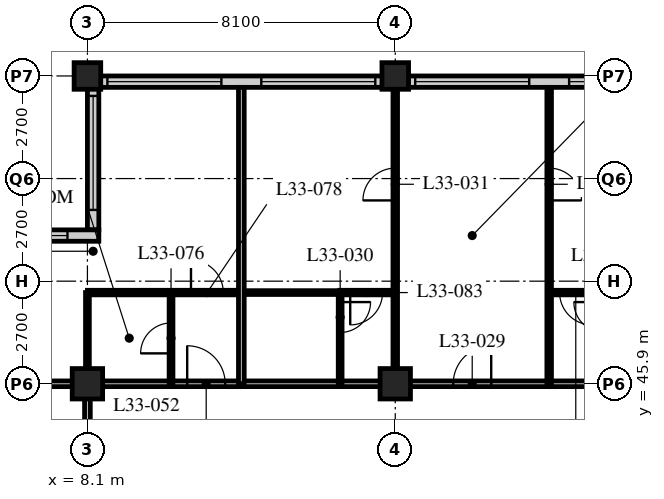
"""IFC4 building model, lengths in metres.
Left out: names, types, materials, properties, quantities, classifications, styles, units other than length and angle.
Written with IfcOpenShell. Run it as: python <this file> out.ifc"""

import sys

from ifc_helpers import new_model, si_unit, direction, frame, frame_2d, origin, origin_2d, place, context, subcontext, project, spatial, rectangle, hollow_rectangle, extrude, element, fill, save


model = new_model("IFC4")
c1 = context("Model", 3, precision=1e-05, world=origin(), true_north=direction((0.0, 1.0)))
c2 = subcontext(c1, "Body", "Model", "MODEL_VIEW")
j1 = project(units=[si_unit("LENGTHUNIT", "METRE"), si_unit("PLANEANGLEUNIT", "RADIAN")], contexts=[c1])
p1 = place(None, origin())
s1 = spatial("IfcSite", under=j1, at=p1, CompositionType="ELEMENT")
p2 = place(p1, origin())
s2 = spatial("IfcBuilding", under=s1, at=p2, CompositionType="ELEMENT")
p3 = place(p2, frame((0.0, 0.0, 130.6)))
s3 = spatial("IfcBuildingStorey", under=s2, at=p3, CompositionType="ELEMENT", Elevation=130.6)
p4 = place(p3, frame((8.1, 45.9, 0.0), z_axis=(0.0, 0.0, 1.0), x_axis=(1.0, 0.0, 0.0)))
e1 = element("IfcColumn", 1, at=p4, inside=s3, PredefinedType="COLUMN", context=c2, shape_type="SweptSolid", body=[
    extrude(hollow_rectangle(XDim=0.8, YDim=0.8, WallThickness=0.08, at=origin_2d()), origin(), (0.0, 0.0, 1.0), 3.4),
])
p5 = place(p3, frame((8.1, 54.0, 0.0), z_axis=(0.0, 0.0, 1.0), x_axis=(1.0, 0.0, 0.0)))
e2 = element("IfcColumn", 2, at=p5, inside=s3, PredefinedType="COLUMN", context=c2, shape_type="SweptSolid", body=[
    extrude(hollow_rectangle(XDim=0.7, YDim=0.7, WallThickness=0.07, at=origin_2d()), origin(), (0.0, 0.0, 1.0), 3.4),
])
p6 = place(p3, frame((16.2, 45.9, 0.0), z_axis=(0.0, 0.0, 1.0), x_axis=(1.0, 0.0, 0.0)))
e3 = element("IfcColumn", 3, at=p6, inside=s3, PredefinedType="COLUMN", context=c2, shape_type="SweptSolid", body=[
    extrude(hollow_rectangle(XDim=0.8, YDim=0.8, WallThickness=0.08, at=origin_2d()), origin(), (0.0, 0.0, 1.0), 3.4),
])
p7 = place(p3, frame((16.2, 54.0, 0.0), z_axis=(0.0, 0.0, 1.0), x_axis=(1.0, 0.0, 0.0)))
e4 = element("IfcColumn", 4, at=p7, inside=s3, PredefinedType="COLUMN", context=c2, shape_type="SweptSolid", body=[
    extrude(hollow_rectangle(XDim=0.7, YDim=0.7, WallThickness=0.07, at=origin_2d()), origin(), (0.0, 0.0, 1.0), 3.4),
])
p8 = place(p3, frame((48.3, 53.85, 0.0), z_axis=(0.0, 0.0, 1.0), x_axis=(-1.0, 0.0, 0.0)))
e5 = element("IfcWall", 5, at=p8, inside=s3, PredefinedType="SOLIDWALL", context=c2, shape_type="SweptSolid", body=[
    extrude(rectangle(XDim=40.2, YDim=0.3, at=frame_2d((20.1, 0.0))), origin(), (0.0, 0.0, 1.0), 3.19),
])
p9 = place(p8, frame((0.225, 0.0, 0.9)))
e6 = element("IfcOpeningElement", 6, at=p9, cuts=e5, PredefinedType="OPENING", context=c2, shape_type="SweptSolid", body=[
    extrude(rectangle(XDim=3.0, YDim=2.0, at=frame_2d((1.5, 1.0))), frame((0.0, 0.16, 0.0), z_axis=(0.0, -1.0, 0.0), x_axis=(1.0, 0.0, 0.0)), (0.0, 0.0, 1.0), 0.32),
])
p10 = place(p8, frame((4.275, 0.0, 0.9)))
e7 = element("IfcOpeningElement", 7, at=p10, cuts=e5, PredefinedType="OPENING", context=c2, shape_type="SweptSolid", body=[
    extrude(rectangle(XDim=3.0, YDim=2.0, at=frame_2d((1.5, 1.0))), frame((0.0, 0.16, 0.0), z_axis=(0.0, -1.0, 0.0), x_axis=(1.0, 0.0, 0.0)), (0.0, 0.0, 1.0), 0.32),
])
p11 = place(p8, frame((8.325, 0.0, 0.9)))
e8 = element("IfcOpeningElement", 8, at=p11, cuts=e5, PredefinedType="OPENING", context=c2, shape_type="SweptSolid", body=[
    extrude(rectangle(XDim=3.0, YDim=2.0, at=frame_2d((1.5, 1.0))), frame((0.0, 0.16, 0.0), z_axis=(0.0, -1.0, 0.0), x_axis=(1.0, 0.0, 0.0)), (0.0, 0.0, 1.0), 0.32),
])
p12 = place(p8, frame((12.375, 0.0, 0.9)))
e9 = element("IfcOpeningElement", 9, at=p12, cuts=e5, PredefinedType="OPENING", context=c2, shape_type="SweptSolid", body=[
    extrude(rectangle(XDim=3.0, YDim=2.0, at=frame_2d((1.5, 1.0))), frame((0.0, 0.16, 0.0), z_axis=(0.0, -1.0, 0.0), x_axis=(1.0, 0.0, 0.0)), (0.0, 0.0, 1.0), 0.32),
])
p13 = place(p8, frame((16.425, 0.0, 0.9)))
e10 = element("IfcOpeningElement", 10, at=p13, cuts=e5, PredefinedType="OPENING", context=c2, shape_type="SweptSolid", body=[
    extrude(rectangle(XDim=3.0, YDim=2.0, at=frame_2d((1.5, 1.0))), frame((0.0, 0.16, 0.0), z_axis=(0.0, -1.0, 0.0), x_axis=(1.0, 0.0, 0.0)), (0.0, 0.0, 1.0), 0.32),
])
p14 = place(p8, frame((20.475, 0.0, 0.9)))
e11 = element("IfcOpeningElement", 11, at=p14, cuts=e5, PredefinedType="OPENING", context=c2, shape_type="SweptSolid", body=[
    extrude(rectangle(XDim=3.0, YDim=2.0, at=frame_2d((1.5, 1.0))), frame((0.0, 0.16, 0.0), z_axis=(0.0, -1.0, 0.0), x_axis=(1.0, 0.0, 0.0)), (0.0, 0.0, 1.0), 0.32),
])
p15 = place(p8, frame((24.525, 0.0, 0.9)))
e12 = element("IfcOpeningElement", 12, at=p15, cuts=e5, PredefinedType="OPENING", context=c2, shape_type="SweptSolid", body=[
    extrude(rectangle(XDim=3.0, YDim=2.0, at=frame_2d((1.5, 1.0))), frame((0.0, 0.16, 0.0), z_axis=(0.0, -1.0, 0.0), x_axis=(1.0, 0.0, 0.0)), (0.0, 0.0, 1.0), 0.32),
])
p16 = place(p8, frame((28.575, 0.0, 0.9)))
e13 = element("IfcOpeningElement", 13, at=p16, cuts=e5, PredefinedType="OPENING", context=c2, shape_type="SweptSolid", body=[
    extrude(rectangle(XDim=3.0, YDim=2.0, at=frame_2d((1.5, 1.0))), frame((0.0, 0.16, 0.0), z_axis=(0.0, -1.0, 0.0), x_axis=(1.0, 0.0, 0.0)), (0.0, 0.0, 1.0), 0.32),
])
p17 = place(p8, frame((32.625, 0.0, 0.9)))
e14 = element("IfcOpeningElement", 14, at=p17, cuts=e5, PredefinedType="OPENING", context=c2, shape_type="SweptSolid", body=[
    extrude(rectangle(XDim=3.0, YDim=2.0, at=frame_2d((1.5, 1.0))), frame((0.0, 0.16, 0.0), z_axis=(0.0, -1.0, 0.0), x_axis=(1.0, 0.0, 0.0)), (0.0, 0.0, 1.0), 0.32),
])
p18 = place(p8, frame((36.675, 0.0, 0.9)))
e15 = element("IfcOpeningElement", 15, at=p18, cuts=e5, PredefinedType="OPENING", context=c2, shape_type="SweptSolid", body=[
    extrude(rectangle(XDim=3.0, YDim=2.0, at=frame_2d((1.5, 1.0))), frame((0.0, 0.16, 0.0), z_axis=(0.0, -1.0, 0.0), x_axis=(1.0, 0.0, 0.0)), (0.0, 0.0, 1.0), 0.32),
])
p19 = place(p3, frame((8.25, 53.7, 0.0), z_axis=(0.0, 0.0, 1.0), x_axis=(0.0, -1.0, 0.0)))
e16 = element("IfcWall", 16, at=p19, inside=s3, PredefinedType="SOLIDWALL", context=c2, shape_type="SweptSolid", body=[
    extrude(rectangle(XDim=3.75, YDim=0.3, at=frame_2d((1.875, 0.0))), origin(), (0.0, 0.0, 1.0), 3.19),
])
p20 = place(p19, frame((0.225, 0.0, 0.9)))
e17 = element("IfcOpeningElement", 17, at=p20, cuts=e16, PredefinedType="OPENING", context=c2, shape_type="SweptSolid", body=[
    extrude(rectangle(XDim=3.0, YDim=1.5, at=frame_2d((1.5, 0.75))), frame((0.0, 0.16, 0.0), z_axis=(0.0, -1.0, 0.0), x_axis=(1.0, 0.0, 0.0)), (0.0, 0.0, 1.0), 0.32),
])
p21 = place(p3, frame((8.4, 49.8, 0.0), z_axis=(0.0, 0.0, 1.0), x_axis=(-1.0, 0.0, 0.0)))
e18 = element("IfcWall", 18, at=p21, inside=s3, PredefinedType="SOLIDWALL", context=c2, shape_type="SweptSolid", body=[
    extrude(rectangle(XDim=4.35, YDim=0.3, at=frame_2d((2.175, 0.0))), origin(), (0.0, 0.0, 1.0), 3.19),
])
p22 = place(p21, frame((0.825, 0.0, 0.9)))
e19 = element("IfcOpeningElement", 19, at=p22, cuts=e18, PredefinedType="OPENING", context=c2, shape_type="SweptSolid", body=[
    extrude(rectangle(XDim=3.0, YDim=1.5, at=frame_2d((1.5, 0.75))), frame((0.0, 0.16, 0.0), z_axis=(0.0, -1.0, 0.0), x_axis=(1.0, 0.0, 0.0)), (0.0, 0.0, 1.0), 0.32),
])
p23 = place(p3, frame((8.1, 45.9, 0.0), z_axis=(0.0, 0.0, 1.0), x_axis=(1.0, 0.0, 0.0)))
e20 = element("IfcWall", 20, at=p23, inside=s3, PredefinedType="PARTITIONING", context=c2, shape_type="SweptSolid", body=[
    extrude(rectangle(XDim=40.5, YDim=0.15, at=frame_2d((20.25, 0.0))), origin(), (0.0, 0.0, 1.0), 2.578),
])
p24 = place(p23, frame((9.625, 0.0, 0.0)))
e21 = element("IfcOpeningElement", 21, at=p24, cuts=e20, PredefinedType="OPENING", context=c2, shape_type="SweptSolid", body=[
    extrude(rectangle(XDim=1.0, YDim=2.1, at=frame_2d((0.5, 1.05))), frame((0.0, 0.085, 0.0), z_axis=(0.0, -1.0, 0.0), x_axis=(1.0, 0.0, 0.0)), (0.0, 0.0, 1.0), 0.17),
])
p25 = place(p23, frame((21.65, 0.0, 0.0)))
e22 = element("IfcOpeningElement", 22, at=p25, cuts=e20, PredefinedType="OPENING", context=c2, shape_type="SweptSolid", body=[
    extrude(rectangle(XDim=1.0, YDim=2.1, at=frame_2d((0.5, 1.05))), frame((0.0, 0.085, 0.0), z_axis=(0.0, -1.0, 0.0), x_axis=(1.0, 0.0, 0.0)), (0.0, 0.0, 1.0), 0.17),
])
p26 = place(p23, frame((26.75, 0.0, 0.0)))
e23 = element("IfcOpeningElement", 23, at=p26, cuts=e20, PredefinedType="OPENING", context=c2, shape_type="SweptSolid", body=[
    extrude(rectangle(XDim=1.0, YDim=2.1, at=frame_2d((0.5, 1.05))), frame((0.0, 0.085, 0.0), z_axis=(0.0, -1.0, 0.0), x_axis=(1.0, 0.0, 0.0)), (0.0, 0.0, 1.0), 0.17),
])
p27 = place(p23, frame((28.95, 0.0, 0.0)))
e24 = element("IfcOpeningElement", 24, at=p27, cuts=e20, PredefinedType="OPENING", context=c2, shape_type="SweptSolid", body=[
    extrude(rectangle(XDim=1.0, YDim=2.1, at=frame_2d((0.5, 1.05))), frame((0.0, 0.085, 0.0), z_axis=(0.0, -1.0, 0.0), x_axis=(1.0, 0.0, 0.0)), (0.0, 0.0, 1.0), 0.17),
])
p28 = place(p23, frame((34.85, 0.0, 0.0)))
e25 = element("IfcOpeningElement", 25, at=p28, cuts=e20, PredefinedType="OPENING", context=c2, shape_type="SweptSolid", body=[
    extrude(rectangle(XDim=1.0, YDim=2.1, at=frame_2d((0.5, 1.05))), frame((0.0, 0.085, 0.0), z_axis=(0.0, -1.0, 0.0), x_axis=(1.0, 0.0, 0.0)), (0.0, 0.0, 1.0), 0.17),
])
p29 = place(p23, frame((36.875, 0.0, 0.0)))
e26 = element("IfcOpeningElement", 26, at=p29, cuts=e20, PredefinedType="OPENING", context=c2, shape_type="SweptSolid", body=[
    extrude(rectangle(XDim=1.0, YDim=2.1, at=frame_2d((0.5, 1.05))), frame((0.0, 0.085, 0.0), z_axis=(0.0, -1.0, 0.0), x_axis=(1.0, 0.0, 0.0)), (0.0, 0.0, 1.0), 0.17),
])
p30 = place(p23, frame((2.625, 0.0, 0.0)))
e27 = element("IfcOpeningElement", 27, at=p30, cuts=e20, PredefinedType="OPENING", context=c2, shape_type="SweptSolid", body=[
    extrude(rectangle(XDim=1.0, YDim=2.1, at=frame_2d((0.5, 1.05))), frame((0.0, 0.085, 0.0), z_axis=(0.0, -1.0, 0.0), x_axis=(1.0, 0.0, 0.0)), (0.0, 0.0, 1.0), 0.17),
])
p31 = place(p3, frame((8.1, 21.6, 0.0), z_axis=(0.0, 0.0, 1.0), x_axis=(0.0, 1.0, 0.0)))
e28 = element("IfcWall", 28, at=p31, inside=s3, PredefinedType="PARTITIONING", context=c2, shape_type="SweptSolid", body=[
    extrude(rectangle(XDim=24.3, YDim=0.15, at=frame_2d((12.15, 0.0))), origin(), (0.0, 0.0, 1.0), 2.578),
])
p32 = place(p31, frame((5.45, 0.0, 0.0)))
e29 = element("IfcOpeningElement", 29, at=p32, cuts=e28, PredefinedType="OPENING", context=c2, shape_type="SweptSolid", body=[
    extrude(rectangle(XDim=1.0, YDim=2.1, at=frame_2d((0.5, 1.05))), frame((0.0, 0.085, 0.0), z_axis=(0.0, -1.0, 0.0), x_axis=(1.0, 0.0, 0.0)), (0.0, 0.0, 1.0), 0.17),
])
p33 = place(p31, frame((10.0, 0.0, 0.0)))
e30 = element("IfcOpeningElement", 30, at=p33, cuts=e28, PredefinedType="OPENING", context=c2, shape_type="SweptSolid", body=[
    extrude(rectangle(XDim=1.0, YDim=2.1, at=frame_2d((0.5, 1.05))), frame((0.0, 0.085, 0.0), z_axis=(0.0, -1.0, 0.0), x_axis=(1.0, 0.0, 0.0)), (0.0, 0.0, 1.0), 0.17),
])
p34 = place(p31, frame((21.65, 0.0, 0.0)))
e31 = element("IfcOpeningElement", 31, at=p34, cuts=e28, PredefinedType="OPENING", context=c2, shape_type="SweptSolid", body=[
    extrude(rectangle(XDim=1.0, YDim=2.1, at=frame_2d((0.5, 1.05))), frame((0.0, 0.085, 0.0), z_axis=(0.0, -1.0, 0.0), x_axis=(1.0, 0.0, 0.0)), (0.0, 0.0, 1.0), 0.17),
])
p35 = place(p3, frame((12.15, 48.3, 0.0), z_axis=(0.0, 0.0, 1.0), x_axis=(1.0, 0.0, 0.0)))
e32 = element("IfcWall", 32, at=p35, inside=s3, PredefinedType="PARTITIONING", context=c2, shape_type="SweptSolid", body=[
    extrude(rectangle(XDim=2.6, YDim=0.1, at=frame_2d((1.3, 0.0))), origin(), (0.0, 0.0, 1.0), 3.19),
])
p36 = place(p3, frame((14.75, 45.9, 0.0), z_axis=(0.0, 0.0, 1.0), x_axis=(0.0, 1.0, 0.0)))
e33 = element("IfcWall", 33, at=p36, inside=s3, PredefinedType="PARTITIONING", context=c2, shape_type="SweptSolid", body=[
    extrude(rectangle(XDim=2.4, YDim=0.1, at=frame_2d((1.2, 0.0))), origin(), (0.0, 0.0, 1.0), 3.19),
])
p37 = place(p36, frame((1.35, 0.0, 0.0)))
e34 = element("IfcOpeningElement", 34, at=p37, cuts=e33, PredefinedType="OPENING", context=c2, shape_type="SweptSolid", body=[
    extrude(rectangle(XDim=0.8, YDim=2.1, at=frame_2d((0.4, 1.05))), frame((0.0, 0.06, 0.0), z_axis=(0.0, -1.0, 0.0), x_axis=(1.0, 0.0, 0.0)), (0.0, 0.0, 1.0), 0.12),
])
p38 = place(p3, frame((16.2, 45.9, 0.0), z_axis=(0.0, 0.0, 1.0), x_axis=(0.0, 1.0, 0.0)))
e35 = element("IfcWall", 35, at=p38, inside=s3, PredefinedType="PARTITIONING", context=c2, shape_type="SweptSolid", body=[
    extrude(rectangle(XDim=7.8, YDim=0.12, at=frame_2d((3.9, 0.0))), origin(), (0.0, 0.0, 1.0), 2.578),
])
p39 = place(p38, frame((4.825, 0.0, 0.0)))
e36 = element("IfcOpeningElement", 36, at=p39, cuts=e35, PredefinedType="OPENING", context=c2, shape_type="SweptSolid", body=[
    extrude(rectangle(XDim=0.85, YDim=2.1, at=frame_2d((0.425, 1.05))), frame((0.0, 0.07, 0.0), z_axis=(0.0, -1.0, 0.0), x_axis=(1.0, 0.0, 0.0)), (0.0, 0.0, 1.0), 0.14),
])
p40 = place(p3, frame((20.25, 45.9, 0.0), z_axis=(0.0, 0.0, 1.0), x_axis=(0.0, 1.0, 0.0)))
e37 = element("IfcWall", 37, at=p40, inside=s3, PredefinedType="PARTITIONING", context=c2, shape_type="SweptSolid", body=[
    extrude(rectangle(XDim=7.8, YDim=0.12, at=frame_2d((3.9, 0.0))), origin(), (0.0, 0.0, 1.0), 3.19),
])
p41 = place(p40, frame((4.825, 0.0, 0.0)))
e38 = element("IfcOpeningElement", 38, at=p41, cuts=e37, PredefinedType="OPENING", context=c2, shape_type="SweptSolid", body=[
    extrude(rectangle(XDim=0.85, YDim=2.1, at=frame_2d((0.425, 1.05))), frame((0.0, 0.07, 0.0), z_axis=(0.0, -1.0, 0.0), x_axis=(1.0, 0.0, 0.0)), (0.0, 0.0, 1.0), 0.14),
])
p42 = place(p3, frame((8.1, 48.3, 0.0), z_axis=(0.0, 0.0, 1.0), x_axis=(1.0, 0.0, 0.0)))
e39 = element("IfcWall", 39, at=p42, inside=s3, PredefinedType="PARTITIONING", context=c2, shape_type="SweptSolid", body=[
    extrude(rectangle(XDim=4.05, YDim=0.12, at=frame_2d((2.025, 0.0))), origin(), (0.0, 0.0, 1.0), 3.19),
])
p43 = place(p42, frame((2.725, 0.0, 0.0)))
e40 = element("IfcOpeningElement", 40, at=p43, cuts=e39, PredefinedType="OPENING", context=c2, shape_type="SweptSolid", body=[
    extrude(rectangle(XDim=0.85, YDim=2.1, at=frame_2d((0.425, 1.05))), frame((0.0, 0.07, 0.0), z_axis=(0.0, -1.0, 0.0), x_axis=(1.0, 0.0, 0.0)), (0.0, 0.0, 1.0), 0.14),
])
p44 = place(p3, frame((10.3, 45.9, 0.0), z_axis=(0.0, 0.0, 1.0), x_axis=(0.0, 1.0, 0.0)))
e41 = element("IfcWall", 41, at=p44, inside=s3, PredefinedType="PARTITIONING", context=c2, shape_type="SweptSolid", body=[
    extrude(rectangle(XDim=2.4, YDim=0.1, at=frame_2d((1.2, 0.0))), origin(), (0.0, 0.0, 1.0), 3.19),
])
p45 = place(p44, frame((0.8, 0.0, 0.0)))
e42 = element("IfcOpeningElement", 42, at=p45, cuts=e41, PredefinedType="OPENING", context=c2, shape_type="SweptSolid", body=[
    extrude(rectangle(XDim=0.8, YDim=2.1, at=frame_2d((0.4, 1.05))), frame((0.0, 0.06, 0.0), z_axis=(0.0, -1.0, 0.0), x_axis=(1.0, 0.0, 0.0)), (0.0, 0.0, 1.0), 0.12),
])
p46 = place(p3, frame((8.1, 45.9, 0.0), z_axis=(0.0, 0.0, 1.0), x_axis=(0.0, 1.0, 0.0)))
e43 = element("IfcWall", 43, at=p46, inside=s3, PredefinedType="PARTITIONING", context=c2, shape_type="SweptSolid", body=[
    extrude(rectangle(XDim=2.4, YDim=0.1, at=frame_2d((1.2, 0.0))), origin(), (0.0, 0.0, 1.0), 2.578),
])
p47 = place(p3, frame((4.35, 45.9, 0.0), z_axis=(0.0, 0.0, 1.0), x_axis=(1.0, 0.0, 0.0)))
e44 = element("IfcWall", 44, at=p47, inside=s3, PredefinedType="PARTITIONING", context=c2, shape_type="SweptSolid", body=[
    extrude(rectangle(XDim=3.75, YDim=0.15, at=frame_2d((1.875, 0.0))), origin(), (0.0, 0.0, 1.0), 2.578),
])
p48 = place(p3, frame((12.15, 45.9, 0.0), z_axis=(0.0, 0.0, 1.0), x_axis=(0.0, 1.0, 0.0)))
e45 = element("IfcWall", 45, at=p48, inside=s3, PredefinedType="PARTITIONING", context=c2, shape_type="SweptSolid", body=[
    extrude(rectangle(XDim=7.8, YDim=0.15, at=frame_2d((3.9, 0.0))), origin(), (0.0, 0.0, 1.0), 3.19),
])
p49 = place(p3, frame((14.74, 48.3, 0.0), z_axis=(0.0, 0.0, 1.0), x_axis=(1.0, 0.0, 0.0)))
e46 = element("IfcWall", 46, at=p49, inside=s3, PredefinedType="PARTITIONING", context=c2, shape_type="SweptSolid", body=[
    extrude(rectangle(XDim=1.46, YDim=0.12, at=frame_2d((0.73, 0.0))), origin(), (0.0, 0.0, 1.0), 3.19),
])
p50 = place(p49, frame((0.275, 0.0, 0.0)))
e47 = element("IfcOpeningElement", 47, at=p50, cuts=e46, PredefinedType="OPENING", context=c2, shape_type="SweptSolid", body=[
    extrude(rectangle(XDim=0.85, YDim=2.1, at=frame_2d((0.425, 1.05))), frame((0.0, 0.07, 0.0), z_axis=(0.0, -1.0, 0.0), x_axis=(1.0, 0.0, 0.0)), (0.0, 0.0, 1.0), 0.14),
])
p51 = place(p3, frame((20.25, 48.3, 0.0), z_axis=(0.0, 0.0, 1.0), x_axis=(1.0, 0.0, 0.0)))
e48 = element("IfcWall", 48, at=p51, inside=s3, PredefinedType="PARTITIONING", context=c2, shape_type="SweptSolid", body=[
    extrude(rectangle(XDim=1.46, YDim=0.12, at=frame_2d((0.73, 0.0))), origin(), (0.0, 0.0, 1.0), 3.19),
])
p52 = place(p51, frame((0.275, 0.0, 0.0)))
e49 = element("IfcOpeningElement", 49, at=p52, cuts=e48, PredefinedType="OPENING", context=c2, shape_type="SweptSolid", body=[
    extrude(rectangle(XDim=0.85, YDim=2.1, at=frame_2d((0.425, 1.05))), frame((0.0, 0.07, 0.0), z_axis=(0.0, -1.0, 0.0), x_axis=(1.0, 0.0, 0.0)), (0.0, 0.0, 1.0), 0.14),
])
p53 = place(p15, origin())
e50 = element("IfcWindow", 50, at=p53, inside=s3, PartitioningType="SINGLE_PANEL", PredefinedType="WINDOW", context=c2, shape_type="SweptSolid", body=[
    extrude(rectangle(XDim=3.0, YDim=2.0, at=frame_2d((1.5, 1.0))), frame((0.0, 0.03, 0.0), z_axis=(0.0, -1.0, 0.0), x_axis=(1.0, 0.0, 0.0)), (0.0, 0.0, 1.0), 0.06),
])
fill(e12, e50)
p54 = place(p16, origin())
e51 = element("IfcWindow", 51, at=p54, inside=s3, PartitioningType="SINGLE_PANEL", PredefinedType="WINDOW", context=c2, shape_type="SweptSolid", body=[
    extrude(rectangle(XDim=3.0, YDim=2.0, at=frame_2d((1.5, 1.0))), frame((0.0, 0.03, 0.0), z_axis=(0.0, -1.0, 0.0), x_axis=(1.0, 0.0, 0.0)), (0.0, 0.0, 1.0), 0.06),
])
fill(e13, e51)
p55 = place(p17, origin())
e52 = element("IfcWindow", 52, at=p55, inside=s3, PartitioningType="SINGLE_PANEL", PredefinedType="WINDOW", context=c2, shape_type="SweptSolid", body=[
    extrude(rectangle(XDim=3.0, YDim=2.0, at=frame_2d((1.5, 1.0))), frame((0.0, 0.03, 0.0), z_axis=(0.0, -1.0, 0.0), x_axis=(1.0, 0.0, 0.0)), (0.0, 0.0, 1.0), 0.06),
])
fill(e14, e52)
p56 = place(p18, origin())
e53 = element("IfcWindow", 53, at=p56, inside=s3, PartitioningType="SINGLE_PANEL", PredefinedType="WINDOW", context=c2, shape_type="SweptSolid", body=[
    extrude(rectangle(XDim=3.0, YDim=2.0, at=frame_2d((1.5, 1.0))), frame((0.0, 0.03, 0.0), z_axis=(0.0, -1.0, 0.0), x_axis=(1.0, 0.0, 0.0)), (0.0, 0.0, 1.0), 0.06),
])
fill(e15, e53)
p57 = place(p20, origin())
e54 = element("IfcWindow", 54, at=p57, inside=s3, PartitioningType="SINGLE_PANEL", PredefinedType="WINDOW", context=c2, shape_type="SweptSolid", body=[
    extrude(rectangle(XDim=3.0, YDim=1.5, at=frame_2d((1.5, 0.75))), frame((0.0, 0.03, 0.0), z_axis=(0.0, -1.0, 0.0), x_axis=(1.0, 0.0, 0.0)), (0.0, 0.0, 1.0), 0.06),
])
fill(e17, e54)
p58 = place(p22, origin())
e55 = element("IfcWindow", 55, at=p58, inside=s3, PartitioningType="SINGLE_PANEL", PredefinedType="WINDOW", context=c2, shape_type="SweptSolid", body=[
    extrude(rectangle(XDim=3.0, YDim=1.5, at=frame_2d((1.5, 0.75))), frame((0.0, 0.03, 0.0), z_axis=(0.0, -1.0, 0.0), x_axis=(1.0, 0.0, 0.0)), (0.0, 0.0, 1.0), 0.06),
])
fill(e19, e55)
p59 = place(p24, origin())
e56 = element("IfcDoor", 56, at=p59, inside=s3, OperationType="SINGLE_SWING_RIGHT", PredefinedType="DOOR", context=c2, shape_type="SweptSolid", body=[
    extrude(rectangle(XDim=1.0, YDim=2.1, at=frame_2d((0.5, 1.05))), frame((0.0, 0.025, 0.0), z_axis=(0.0, -1.0, 0.0), x_axis=(1.0, 0.0, 0.0)), (0.0, 0.0, 1.0), 0.05),
])
fill(e21, e56)
p60 = place(p37, origin())
e57 = element("IfcDoor", 57, at=p60, inside=s3, OperationType="SINGLE_SWING_LEFT", PredefinedType="DOOR", context=c2, shape_type="SweptSolid", body=[
    extrude(rectangle(XDim=0.8, YDim=2.1, at=frame_2d((0.4, 1.05))), frame((0.0, 0.025, 0.0), z_axis=(0.0, -1.0, 0.0), x_axis=(1.0, 0.0, 0.0)), (0.0, 0.0, 1.0), 0.05),
])
fill(e34, e57)
p61 = place(p39, origin())
e58 = element("IfcDoor", 58, at=p61, inside=s3, OperationType="SINGLE_SWING_LEFT", PredefinedType="DOOR", context=c2, shape_type="SweptSolid", body=[
    extrude(rectangle(XDim=0.85, YDim=2.1, at=frame_2d((0.425, 1.05))), frame((0.0, 0.025, 0.0), z_axis=(0.0, -1.0, 0.0), x_axis=(1.0, 0.0, 0.0)), (0.0, 0.0, 1.0), 0.05),
])
fill(e36, e58)
p62 = place(p41, origin())
e59 = element("IfcDoor", 59, at=p62, inside=s3, OperationType="SINGLE_SWING_RIGHT", PredefinedType="DOOR", context=c2, shape_type="SweptSolid", body=[
    extrude(rectangle(XDim=0.85, YDim=2.1, at=frame_2d((0.425, 1.05))), frame((0.0, 0.025, 0.0), z_axis=(0.0, -1.0, 0.0), x_axis=(1.0, 0.0, 0.0)), (0.0, 0.0, 1.0), 0.05),
])
fill(e38, e59)
p63 = place(p45, origin())
e60 = element("IfcDoor", 60, at=p63, inside=s3, OperationType="SINGLE_SWING_LEFT", PredefinedType="DOOR", context=c2, shape_type="SweptSolid", body=[
    extrude(rectangle(XDim=0.8, YDim=2.1, at=frame_2d((0.4, 1.05))), frame((0.0, 0.025, 0.0), z_axis=(0.0, -1.0, 0.0), x_axis=(1.0, 0.0, 0.0)), (0.0, 0.0, 1.0), 0.05),
])
fill(e42, e60)
p64 = place(p30, origin())
e61 = element("IfcDoor", 61, at=p64, inside=s3, OperationType="SINGLE_SWING_LEFT", PredefinedType="DOOR", context=c2, shape_type="SweptSolid", body=[
    extrude(rectangle(XDim=1.0, YDim=2.1, at=frame_2d((0.5, 1.05))), frame((0.0, 0.025, 0.0), z_axis=(0.0, -1.0, 0.0), x_axis=(1.0, 0.0, 0.0)), (0.0, 0.0, 1.0), 0.05),
])
fill(e27, e61)
p65 = place(p43, origin())
e62 = element("IfcDoor", 62, at=p65, inside=s3, OperationType="SINGLE_SWING_LEFT", PredefinedType="DOOR", context=c2, shape_type="SweptSolid", body=[
    extrude(rectangle(XDim=0.85, YDim=2.1, at=frame_2d((0.425, 1.05))), frame((0.0, 0.025, 0.0), z_axis=(0.0, -1.0, 0.0), x_axis=(1.0, 0.0, 0.0)), (0.0, 0.0, 1.0), 0.05),
])
fill(e40, e62)
p66 = place(p50, origin())
e63 = element("IfcDoor", 63, at=p66, inside=s3, OperationType="SINGLE_SWING_RIGHT", PredefinedType="DOOR", context=c2, shape_type="SweptSolid", body=[
    extrude(rectangle(XDim=0.85, YDim=2.1, at=frame_2d((0.425, 1.05))), frame((0.0, 0.025, 0.0), z_axis=(0.0, -1.0, 0.0), x_axis=(1.0, 0.0, 0.0)), (0.0, 0.0, 1.0), 0.05),
])
fill(e47, e63)
p67 = place(p52, origin())
e64 = element("IfcDoor", 64, at=p67, inside=s3, OperationType="SINGLE_SWING_LEFT", PredefinedType="DOOR", context=c2, shape_type="SweptSolid", body=[
    extrude(rectangle(XDim=0.85, YDim=2.1, at=frame_2d((0.425, 1.05))), frame((0.0, 0.025, 0.0), z_axis=(0.0, -1.0, 0.0), x_axis=(1.0, 0.0, 0.0)), (0.0, 0.0, 1.0), 0.05),
])
fill(e49, e64)
save(model, sys.argv[1])
